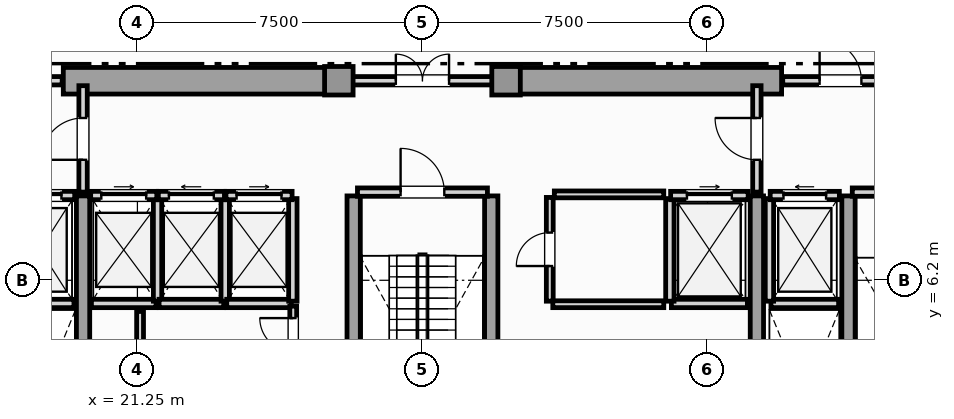
"""IFC4 building model, lengths in metres.
Left out: names, types, materials, properties, quantities, classifications, styles, units other than length and angle.
Written with IfcOpenShell. Run it as: python <this file> out.ifc"""

import sys

from ifc_helpers import new_model, si_unit, direction, frame, frame_2d, origin, origin_2d, place, context, subcontext, project, spatial, rectangle, extrude, element, fill, save


model = new_model("IFC4")
c1 = context("Model", 3, precision=1e-05, world=origin(), true_north=direction((0.0, 1.0)))
c2 = subcontext(c1, "Body", "Model", "MODEL_VIEW")
j1 = project(units=[si_unit("LENGTHUNIT", "METRE"), si_unit("PLANEANGLEUNIT", "RADIAN")], contexts=[c1])
p1 = place(None, origin())
s1 = spatial("IfcSite", under=j1, at=p1, CompositionType="ELEMENT")
p2 = place(p1, origin())
s2 = spatial("IfcBuilding", under=s1, at=p2, CompositionType="ELEMENT")
p3 = place(p2, frame((0.0, 0.0, 140.15)))
s3 = spatial("IfcBuildingStorey", under=s2, at=p3, CompositionType="ELEMENT", Elevation=140.15)
for number, where, z_axis, x_axis in (
    (1, (19.3, 11.45, 0.0), (0.0, 0.0, 1.0), (1.0, 0.0, 0.0)),
    (2, (30.9, 11.45, 0.0), (0.0, 0.0, 1.0), (1.0, 0.0, 0.0)),
):
    element("IfcWall", number, at=place(p3, frame(where, z_axis=z_axis, x_axis=x_axis)), inside=s3, PredefinedType="SHEAR", context=c2, shape_type="SweptSolid", body=[
        extrude(rectangle(XDim=7.3, YDim=0.7, at=frame_2d((3.65, 0.0))), origin(), (0.0, 0.0, 1.0), 4.83),
    ])
for number, where, z_axis, x_axis in (
    (3, (19.82, 0.92, 0.0), (0.0, 0.0, 1.0), (0.0, 1.0, 0.0)),
    (4, (26.94, 0.92, 0.0), (0.0, 0.0, 1.0), (0.0, 1.0, 0.0)),
    (5, (30.56, 0.92, 0.0), (0.0, 0.0, 1.0), (0.0, 1.0, 0.0)),
    (6, (37.55, 0.92, 0.0), (0.0, 0.0, 1.0), (0.0, 1.0, 0.0)),
    (7, (39.96, 0.92, 0.0), (0.0, 0.0, 1.0), (0.0, 1.0, 0.0)),
):
    element("IfcWall", number, at=place(p3, frame(where, z_axis=z_axis, x_axis=x_axis)), inside=s3, PredefinedType="SHEAR", context=c2, shape_type="SweptSolid", body=[
        extrude(rectangle(XDim=7.5, YDim=0.35, at=frame_2d((3.75, 0.0))), origin(), (0.0, 0.0, 1.0), 4.83),
    ])
for number, where, z_axis, x_axis in (
    (8, (26.55, 11.45, 0.0), (0.0, 0.0, 1.0), (1.0, 0.0, 0.0)),
    (9, (30.95, 11.45, 0.0), (0.0, 0.0, 1.0), (1.0, 0.0, 0.0)),
):
    element("IfcColumn", number, at=place(p3, frame(where, z_axis=z_axis, x_axis=x_axis)), inside=s3, PredefinedType="COLUMN", context=c2, shape_type="SweptSolid", body=[
        extrude(rectangle(XDim=0.75, YDim=0.75, at=origin_2d()), origin(), (0.0, 0.0, 1.0), 5.05),
    ])
p4 = place(p3, frame((17.8, 5.59, 0.0), z_axis=(0.0, 0.0, 1.0), x_axis=(1.0, 0.0, 0.0)))
e10 = element("IfcWall", 10, at=p4, inside=s3, PredefinedType="SOLIDWALL", context=c2, shape_type="SweptSolid", body=[
    extrude(rectangle(XDim=1.78, YDim=0.22, at=frame_2d((0.89, 0.0))), origin(), (0.0, 0.0, 1.0), 4.83),
])
p5 = place(p3, frame((17.78, 8.43, 0.0), z_axis=(0.0, 0.0, 1.0), x_axis=(1.0, 0.0, 0.0)))
e11 = element("IfcWall", 11, at=p5, inside=s3, PredefinedType="SOLIDWALL", context=c2, shape_type="SweptSolid", body=[
    extrude(rectangle(XDim=1.82, YDim=0.22, at=frame_2d((0.91, 0.0))), origin(), (0.0, 0.0, 1.0), 4.83),
])
p6 = place(p5, frame((0.35, 0.0, 0.0)))
e12 = element("IfcOpeningElement", 12, at=p6, cuts=e11, PredefinedType="OPENING", context=c2, shape_type="SweptSolid", body=[
    extrude(rectangle(XDim=1.12, YDim=2.25, at=frame_2d((0.56, 1.125))), frame((0.0, 0.12, 0.0), z_axis=(0.0, -1.0, 0.0), x_axis=(1.0, 0.0, 0.0)), (0.0, 0.0, 1.0), 0.24),
])
p7 = place(p3, frame((37.92, 5.59, 0.0), z_axis=(0.0, 0.0, 1.0), x_axis=(1.0, 0.0, 0.0)))
e13 = element("IfcWall", 13, at=p7, inside=s3, PredefinedType="SOLIDWALL", context=c2, shape_type="SweptSolid", body=[
    extrude(rectangle(XDim=1.78, YDim=0.22, at=frame_2d((0.89, 0.0))), origin(), (0.0, 0.0, 1.0), 4.83),
])
p8 = place(p3, frame((37.88, 5.65, 0.0), z_axis=(0.0, 0.0, 1.0), x_axis=(0.0, 1.0, 0.0)))
e14 = element("IfcWall", 14, at=p8, inside=s3, PredefinedType="SOLIDWALL", context=c2, shape_type="SweptSolid", body=[
    extrude(rectangle(XDim=2.7, YDim=0.22, at=frame_2d((1.35, 0.0))), origin(), (0.0, 0.0, 1.0), 4.83),
])
p9 = place(p3, frame((37.9, 8.43, 0.0), z_axis=(0.0, 0.0, 1.0), x_axis=(1.0, 0.0, 0.0)))
e15 = element("IfcWall", 15, at=p9, inside=s3, PredefinedType="SOLIDWALL", context=c2, shape_type="SweptSolid", body=[
    extrude(rectangle(XDim=1.82, YDim=0.22, at=frame_2d((0.91, 0.0))), origin(), (0.0, 0.0, 1.0), 4.83),
])
p10 = place(p9, frame((0.35, 0.0, 0.0)))
e16 = element("IfcOpeningElement", 16, at=p10, cuts=e15, PredefinedType="OPENING", context=c2, shape_type="SweptSolid", body=[
    extrude(rectangle(XDim=1.12, YDim=2.25, at=frame_2d((0.56, 1.125))), frame((0.0, 0.12, 0.0), z_axis=(0.0, -1.0, 0.0), x_axis=(1.0, 0.0, 0.0)), (0.0, 0.0, 1.0), 0.24),
])
p11 = place(p3, frame((35.3, 5.59, 0.0), z_axis=(0.0, 0.0, 1.0), x_axis=(1.0, 0.0, 0.0)))
e17 = element("IfcWall", 17, at=p11, inside=s3, PredefinedType="SOLIDWALL", context=c2, shape_type="SweptSolid", body=[
    extrude(rectangle(XDim=2.0, YDim=0.22, at=frame_2d((1.0, 0.0))), origin(), (0.0, 0.0, 1.0), 4.83),
])
p12 = place(p3, frame((35.26, 5.65, 0.0), z_axis=(0.0, 0.0, 1.0), x_axis=(0.0, 1.0, 0.0)))
e18 = element("IfcWall", 18, at=p12, inside=s3, PredefinedType="SOLIDWALL", context=c2, shape_type="SweptSolid", body=[
    extrude(rectangle(XDim=2.7, YDim=0.22, at=frame_2d((1.35, 0.0))), origin(), (0.0, 0.0, 1.0), 4.83),
])
p13 = place(p3, frame((35.28, 8.43, 0.0), z_axis=(0.0, 0.0, 1.0), x_axis=(1.0, 0.0, 0.0)))
e19 = element("IfcWall", 19, at=p13, inside=s3, PredefinedType="SOLIDWALL", context=c2, shape_type="SweptSolid", body=[
    extrude(rectangle(XDim=2.04, YDim=0.22, at=frame_2d((1.02, 0.0))), origin(), (0.0, 0.0, 1.0), 4.83),
])
p14 = place(p13, frame((0.43, 0.0, 0.0)))
e20 = element("IfcOpeningElement", 20, at=p14, cuts=e19, PredefinedType="OPENING", context=c2, shape_type="SweptSolid", body=[
    extrude(rectangle(XDim=1.18, YDim=2.2, at=frame_2d((0.59, 1.1))), frame((0.0, 0.12, 0.0), z_axis=(0.0, -1.0, 0.0), x_axis=(1.0, 0.0, 0.0)), (0.0, 0.0, 1.0), 0.24),
])
p15 = place(p3, frame((20.04, 5.59, 0.0), z_axis=(0.0, 0.0, 1.0), x_axis=(1.0, 0.0, 0.0)))
e21 = element("IfcWall", 21, at=p15, inside=s3, PredefinedType="SOLIDWALL", context=c2, shape_type="SweptSolid", body=[
    extrude(rectangle(XDim=1.7, YDim=0.22, at=frame_2d((0.85, 0.0))), origin(), (0.0, 0.0, 1.0), 4.83),
])
p16 = place(p3, frame((21.78, 5.65, 0.0), z_axis=(0.0, 0.0, 1.0), x_axis=(0.0, 1.0, 0.0)))
e22 = element("IfcWall", 22, at=p16, inside=s3, PredefinedType="SOLIDWALL", context=c2, shape_type="SweptSolid", body=[
    extrude(rectangle(XDim=2.7, YDim=0.22, at=frame_2d((1.35, 0.0))), origin(), (0.0, 0.0, 1.0), 4.83),
])
p17 = place(p3, frame((20.02, 8.43, 0.0), z_axis=(0.0, 0.0, 1.0), x_axis=(1.0, 0.0, 0.0)))
e23 = element("IfcWall", 23, at=p17, inside=s3, PredefinedType="SOLIDWALL", context=c2, shape_type="SweptSolid", body=[
    extrude(rectangle(XDim=1.74, YDim=0.22, at=frame_2d((0.87, 0.0))), origin(), (0.0, 0.0, 1.0), 4.83),
])
p18 = place(p17, frame((0.28, 0.0, 0.0)))
e24 = element("IfcOpeningElement", 24, at=p18, cuts=e23, PredefinedType="OPENING", context=c2, shape_type="SweptSolid", body=[
    extrude(rectangle(XDim=1.18, YDim=2.2, at=frame_2d((0.59, 1.1))), frame((0.0, 0.12, 0.0), z_axis=(0.0, -1.0, 0.0), x_axis=(1.0, 0.0, 0.0)), (0.0, 0.0, 1.0), 0.24),
])
p19 = place(p3, frame((21.82, 5.59, 0.0), z_axis=(0.0, 0.0, 1.0), x_axis=(1.0, 0.0, 0.0)))
e25 = element("IfcWall", 25, at=p19, inside=s3, PredefinedType="SOLIDWALL", context=c2, shape_type="SweptSolid", body=[
    extrude(rectangle(XDim=1.7, YDim=0.22, at=frame_2d((0.85, 0.0))), origin(), (0.0, 0.0, 1.0), 4.83),
])
p20 = place(p3, frame((23.56, 5.65, 0.0), z_axis=(0.0, 0.0, 1.0), x_axis=(0.0, 1.0, 0.0)))
e26 = element("IfcWall", 26, at=p20, inside=s3, PredefinedType="SOLIDWALL", context=c2, shape_type="SweptSolid", body=[
    extrude(rectangle(XDim=2.7, YDim=0.22, at=frame_2d((1.35, 0.0))), origin(), (0.0, 0.0, 1.0), 4.83),
])
p21 = place(p3, frame((21.8, 8.43, 0.0), z_axis=(0.0, 0.0, 1.0), x_axis=(1.0, 0.0, 0.0)))
e27 = element("IfcWall", 27, at=p21, inside=s3, PredefinedType="SOLIDWALL", context=c2, shape_type="SweptSolid", body=[
    extrude(rectangle(XDim=1.74, YDim=0.22, at=frame_2d((0.87, 0.0))), origin(), (0.0, 0.0, 1.0), 4.83),
])
p22 = place(p21, frame((0.28, 0.0, 0.0)))
e28 = element("IfcOpeningElement", 28, at=p22, cuts=e27, PredefinedType="OPENING", context=c2, shape_type="SweptSolid", body=[
    extrude(rectangle(XDim=1.18, YDim=2.2, at=frame_2d((0.59, 1.1))), frame((0.0, 0.12, 0.0), z_axis=(0.0, -1.0, 0.0), x_axis=(1.0, 0.0, 0.0)), (0.0, 0.0, 1.0), 0.24),
])
p23 = place(p3, frame((23.6, 5.59, 0.0), z_axis=(0.0, 0.0, 1.0), x_axis=(1.0, 0.0, 0.0)))
e29 = element("IfcWall", 29, at=p23, inside=s3, PredefinedType="SOLIDWALL", context=c2, shape_type="SweptSolid", body=[
    extrude(rectangle(XDim=1.7, YDim=0.22, at=frame_2d((0.85, 0.0))), origin(), (0.0, 0.0, 1.0), 4.83),
])
p24 = place(p3, frame((25.34, 5.65, 0.0), z_axis=(0.0, 0.0, 1.0), x_axis=(0.0, 1.0, 0.0)))
e30 = element("IfcWall", 30, at=p24, inside=s3, PredefinedType="SOLIDWALL", context=c2, shape_type="SweptSolid", body=[
    extrude(rectangle(XDim=2.7, YDim=0.22, at=frame_2d((1.35, 0.0))), origin(), (0.0, 0.0, 1.0), 4.83),
])
p25 = place(p3, frame((23.58, 8.43, 0.0), z_axis=(0.0, 0.0, 1.0), x_axis=(1.0, 0.0, 0.0)))
e31 = element("IfcWall", 31, at=p25, inside=s3, PredefinedType="SOLIDWALL", context=c2, shape_type="SweptSolid", body=[
    extrude(rectangle(XDim=1.74, YDim=0.22, at=frame_2d((0.87, 0.0))), origin(), (0.0, 0.0, 1.0), 4.83),
])
p26 = place(p25, frame((0.28, 0.0, 0.0)))
e32 = element("IfcOpeningElement", 32, at=p26, cuts=e31, PredefinedType="OPENING", context=c2, shape_type="SweptSolid", body=[
    extrude(rectangle(XDim=1.18, YDim=2.2, at=frame_2d((0.59, 1.1))), frame((0.0, 0.12, 0.0), z_axis=(0.0, -1.0, 0.0), x_axis=(1.0, 0.0, 0.0)), (0.0, 0.0, 1.0), 0.24),
])
p27 = place(p3, frame((40.06, 8.52, 0.0), z_axis=(0.0, 0.0, 1.0), x_axis=(1.0, 0.0, 0.0)))
e33 = element("IfcWall", 33, at=p27, inside=s3, PredefinedType="SOLIDWALL", context=c2, shape_type="SweptSolid", body=[
    extrude(rectangle(XDim=3.4, YDim=0.22, at=frame_2d((1.7, 0.0))), origin(), (0.0, 0.0, 1.0), 4.83),
])
p28 = place(p27, frame((1.125, 0.0, 0.0)))
e34 = element("IfcOpeningElement", 34, at=p28, cuts=e33, PredefinedType="OPENING", context=c2, shape_type="SweptSolid", body=[
    extrude(rectangle(XDim=1.15, YDim=2.2, at=frame_2d((0.575, 1.1))), frame((0.0, 0.12, 0.0), z_axis=(0.0, -1.0, 0.0), x_axis=(1.0, 0.0, 0.0)), (0.0, 0.0, 1.0), 0.24),
])
p29 = place(p3, frame((27.04, 8.52, 0.0), z_axis=(0.0, 0.0, 1.0), x_axis=(1.0, 0.0, 0.0)))
e35 = element("IfcWall", 35, at=p29, inside=s3, PredefinedType="SOLIDWALL", context=c2, shape_type="SweptSolid", body=[
    extrude(rectangle(XDim=3.42, YDim=0.22, at=frame_2d((1.71, 0.0))), origin(), (0.0, 0.0, 1.0), 4.83),
])
p30 = place(p29, frame((1.135, 0.0, 0.0)))
e36 = element("IfcOpeningElement", 36, at=p30, cuts=e35, PredefinedType="OPENING", context=c2, shape_type="SweptSolid", body=[
    extrude(rectangle(XDim=1.15, YDim=2.2, at=frame_2d((0.575, 1.1))), frame((0.0, 0.12, 0.0), z_axis=(0.0, -1.0, 0.0), x_axis=(1.0, 0.0, 0.0)), (0.0, 0.0, 1.0), 0.24),
])
p31 = place(p3, frame((19.82, 8.52, 0.0), z_axis=(0.0, 0.0, 1.0), x_axis=(0.0, 1.0, 0.0)))
e37 = element("IfcWall", 37, at=p31, inside=s3, PredefinedType="SOLIDWALL", context=c2, shape_type="SweptSolid", body=[
    extrude(rectangle(XDim=2.8, YDim=0.22, at=frame_2d((1.4, 0.0))), origin(), (0.0, 0.0, 1.0), 4.286),
])
p32 = place(p31, frame((0.85, 0.0, 0.0)))
e38 = element("IfcOpeningElement", 38, at=p32, cuts=e37, PredefinedType="OPENING", context=c2, shape_type="SweptSolid", body=[
    extrude(rectangle(XDim=1.1, YDim=2.2, at=frame_2d((0.55, 1.1))), frame((0.0, 0.12, 0.0), z_axis=(0.0, -1.0, 0.0), x_axis=(1.0, 0.0, 0.0)), (0.0, 0.0, 1.0), 0.24),
])
p33 = place(p3, frame((37.55, 8.52, 0.0), z_axis=(0.0, 0.0, 1.0), x_axis=(0.0, 1.0, 0.0)))
e39 = element("IfcWall", 39, at=p33, inside=s3, PredefinedType="SOLIDWALL", context=c2, shape_type="SweptSolid", body=[
    extrude(rectangle(XDim=2.8, YDim=0.22, at=frame_2d((1.4, 0.0))), origin(), (0.0, 0.0, 1.0), 4.286),
])
p34 = place(p33, frame((0.85, 0.0, 0.0)))
e40 = element("IfcOpeningElement", 40, at=p34, cuts=e39, PredefinedType="OPENING", context=c2, shape_type="SweptSolid", body=[
    extrude(rectangle(XDim=1.1, YDim=2.2, at=frame_2d((0.55, 1.1))), frame((0.0, 0.12, 0.0), z_axis=(0.0, -1.0, 0.0), x_axis=(1.0, 0.0, 0.0)), (0.0, 0.0, 1.0), 0.24),
])
p35 = place(p3, frame((16.23, 11.45, 0.0), z_axis=(0.0, 0.0, 1.0), x_axis=(1.0, 0.0, 0.0)))
e41 = element("IfcWall", 41, at=p35, inside=s3, PredefinedType="SOLIDWALL", context=c2, shape_type="SweptSolid", body=[
    extrude(rectangle(XDim=3.04, YDim=0.22, at=frame_2d((1.52, 0.0))), origin(), (0.0, 0.0, 1.0), 4.83),
])
p36 = place(p35, frame((0.97, 0.0, 0.0)))
e42 = element("IfcOpeningElement", 42, at=p36, cuts=e41, PredefinedType="OPENING", context=c2, shape_type="SweptSolid", body=[
    extrude(rectangle(XDim=1.1, YDim=2.2, at=frame_2d((0.55, 1.1))), frame((0.0, 0.12, 0.0), z_axis=(0.0, -1.0, 0.0), x_axis=(1.0, 0.0, 0.0)), (0.0, 0.0, 1.0), 0.24),
])
p37 = place(p3, frame((26.63, 11.45, 0.0), z_axis=(0.0, 0.0, 1.0), x_axis=(1.0, 0.0, 0.0)))
e43 = element("IfcWall", 43, at=p37, inside=s3, PredefinedType="SOLIDWALL", context=c2, shape_type="SweptSolid", body=[
    extrude(rectangle(XDim=4.24, YDim=0.22, at=frame_2d((2.12, 0.0))), origin(), (0.0, 0.0, 1.0), 4.83),
])
p38 = place(p37, frame((1.42, 0.0, 0.0)))
e44 = element("IfcOpeningElement", 44, at=p38, cuts=e43, PredefinedType="OPENING", context=c2, shape_type="SweptSolid", body=[
    extrude(rectangle(XDim=1.4, YDim=2.2, at=frame_2d((0.7, 1.1))), frame((0.0, 0.12, 0.0), z_axis=(0.0, -1.0, 0.0), x_axis=(1.0, 0.0, 0.0)), (0.0, 0.0, 1.0), 0.24),
])
p39 = place(p3, frame((38.23, 11.45, 0.0), z_axis=(0.0, 0.0, 1.0), x_axis=(1.0, 0.0, 0.0)))
e45 = element("IfcWall", 45, at=p39, inside=s3, PredefinedType="SOLIDWALL", context=c2, shape_type="SweptSolid", body=[
    extrude(rectangle(XDim=3.04, YDim=0.22, at=frame_2d((1.52, 0.0))), origin(), (0.0, 0.0, 1.0), 4.83),
])
p40 = place(p39, frame((0.97, 0.0, 0.0)))
e46 = element("IfcOpeningElement", 46, at=p40, cuts=e45, PredefinedType="OPENING", context=c2, shape_type="SweptSolid", body=[
    extrude(rectangle(XDim=1.1, YDim=2.2, at=frame_2d((0.55, 1.1))), frame((0.0, 0.12, 0.0), z_axis=(0.0, -1.0, 0.0), x_axis=(1.0, 0.0, 0.0)), (0.0, 0.0, 1.0), 0.24),
])
p41 = place(p3, frame((25.35, 4.01, 0.0), z_axis=(0.0, 0.0, 1.0), x_axis=(0.0, 1.0, 0.0)))
e47 = element("IfcWall", 47, at=p41, inside=s3, PredefinedType="PARTITIONING", context=c2, shape_type="SweptSolid", body=[
    extrude(rectangle(XDim=1.51, YDim=0.18, at=frame_2d((0.755, 0.0))), origin(), (0.0, 0.0, 1.0), 4.83),
])
p42 = place(p41, frame((0.315, 0.0, 0.0)))
e48 = element("IfcOpeningElement", 48, at=p42, cuts=e47, PredefinedType="OPENING", context=c2, shape_type="SweptSolid", body=[
    extrude(rectangle(XDim=0.88, YDim=2.05, at=frame_2d((0.44, 1.025))), frame((0.0, 0.1, 0.0), z_axis=(0.0, -1.0, 0.0), x_axis=(1.0, 0.0, 0.0)), (0.0, 0.0, 1.0), 0.2),
])
p43 = place(p3, frame((21.32, 3.96, 0.0), z_axis=(0.0, 0.0, 1.0), x_axis=(0.0, 1.0, 0.0)))
e49 = element("IfcWall", 49, at=p43, inside=s3, PredefinedType="PARTITIONING", context=c2, shape_type="SweptSolid", body=[
    extrude(rectangle(XDim=1.42, YDim=0.18, at=frame_2d((0.71, 0.0))), origin(), (0.0, 0.0, 1.0), 4.83),
])
p44 = place(p3, frame((32.1, 5.65, 0.0), z_axis=(0.0, 0.0, 1.0), x_axis=(0.0, 1.0, 0.0)))
e50 = element("IfcWall", 50, at=p44, inside=s3, PredefinedType="PARTITIONING", context=c2, shape_type="SweptSolid", body=[
    extrude(rectangle(XDim=2.73, YDim=0.18, at=frame_2d((1.365, 0.0))), origin(), (0.0, 0.0, 1.0), 4.83),
])
p45 = place(p44, frame((0.925, 0.0, 0.0)))
e51 = element("IfcOpeningElement", 51, at=p45, cuts=e50, PredefinedType="OPENING", context=c2, shape_type="SweptSolid", body=[
    extrude(rectangle(XDim=0.88, YDim=2.05, at=frame_2d((0.44, 1.025))), frame((0.0, 0.1, 0.0), z_axis=(0.0, -1.0, 0.0), x_axis=(1.0, 0.0, 0.0)), (0.0, 0.0, 1.0), 0.2),
])
p46 = place(p3, frame((32.22, 8.46, 0.0), z_axis=(0.0, 0.0, 1.0), x_axis=(1.0, 0.0, 0.0)))
e52 = element("IfcWall", 52, at=p46, inside=s3, PredefinedType="PARTITIONING", context=c2, shape_type="SweptSolid", body=[
    extrude(rectangle(XDim=2.88, YDim=0.18, at=frame_2d((1.44, 0.0))), origin(), (0.0, 0.0, 1.0), 4.83),
])
p47 = place(p3, frame((32.18, 5.57, 0.0), z_axis=(0.0, 0.0, 1.0), x_axis=(1.0, 0.0, 0.0)))
e53 = element("IfcWall", 53, at=p47, inside=s3, PredefinedType="PARTITIONING", context=c2, shape_type="SweptSolid", body=[
    extrude(rectangle(XDim=2.92, YDim=0.18, at=frame_2d((1.46, 0.0))), origin(), (0.0, 0.0, 1.0), 4.83),
])
p48 = place(p6, origin())
e54 = element("IfcDoor", 54, at=p48, inside=s3, OperationType="SLIDING_TO_RIGHT", PredefinedType="DOOR", context=c2, shape_type="SweptSolid", body=[
    extrude(rectangle(XDim=1.12, YDim=2.25, at=frame_2d((0.56, 1.125))), frame((0.0, 0.025, 0.0), z_axis=(0.0, -1.0, 0.0), x_axis=(1.0, 0.0, 0.0)), (0.0, 0.0, 1.0), 0.05),
])
fill(e12, e54)
p49 = place(p10, origin())
e55 = element("IfcDoor", 55, at=p49, inside=s3, OperationType="SLIDING_TO_LEFT", PredefinedType="DOOR", context=c2, shape_type="SweptSolid", body=[
    extrude(rectangle(XDim=1.12, YDim=2.25, at=frame_2d((0.56, 1.125))), frame((0.0, 0.025, 0.0), z_axis=(0.0, -1.0, 0.0), x_axis=(1.0, 0.0, 0.0)), (0.0, 0.0, 1.0), 0.05),
])
fill(e16, e55)
p50 = place(p14, origin())
e56 = element("IfcDoor", 56, at=p50, inside=s3, OperationType="SLIDING_TO_RIGHT", PredefinedType="DOOR", context=c2, shape_type="SweptSolid", body=[
    extrude(rectangle(XDim=1.18, YDim=2.2, at=frame_2d((0.59, 1.1))), frame((0.0, 0.025, 0.0), z_axis=(0.0, -1.0, 0.0), x_axis=(1.0, 0.0, 0.0)), (0.0, 0.0, 1.0), 0.05),
])
fill(e20, e56)
p51 = place(p18, origin())
e57 = element("IfcDoor", 57, at=p51, inside=s3, OperationType="SLIDING_TO_RIGHT", PredefinedType="DOOR", context=c2, shape_type="SweptSolid", body=[
    extrude(rectangle(XDim=1.18, YDim=2.2, at=frame_2d((0.59, 1.1))), frame((0.0, 0.025, 0.0), z_axis=(0.0, -1.0, 0.0), x_axis=(1.0, 0.0, 0.0)), (0.0, 0.0, 1.0), 0.05),
])
fill(e24, e57)
p52 = place(p22, origin())
e58 = element("IfcDoor", 58, at=p52, inside=s3, OperationType="SLIDING_TO_LEFT", PredefinedType="DOOR", context=c2, shape_type="SweptSolid", body=[
    extrude(rectangle(XDim=1.18, YDim=2.2, at=frame_2d((0.59, 1.1))), frame((0.0, 0.025, 0.0), z_axis=(0.0, -1.0, 0.0), x_axis=(1.0, 0.0, 0.0)), (0.0, 0.0, 1.0), 0.05),
])
fill(e28, e58)
p53 = place(p26, origin())
e59 = element("IfcDoor", 59, at=p53, inside=s3, OperationType="SLIDING_TO_RIGHT", PredefinedType="DOOR", context=c2, shape_type="SweptSolid", body=[
    extrude(rectangle(XDim=1.18, YDim=2.2, at=frame_2d((0.59, 1.1))), frame((0.0, 0.025, 0.0), z_axis=(0.0, -1.0, 0.0), x_axis=(1.0, 0.0, 0.0)), (0.0, 0.0, 1.0), 0.05),
])
fill(e32, e59)
p54 = place(p30, origin())
e60 = element("IfcDoor", 60, at=p54, inside=s3, OperationType="SINGLE_SWING_LEFT", PredefinedType="DOOR", context=c2, shape_type="SweptSolid", body=[
    extrude(rectangle(XDim=1.15, YDim=2.2, at=frame_2d((0.575, 1.1))), frame((0.0, 0.025, 0.0), z_axis=(0.0, -1.0, 0.0), x_axis=(1.0, 0.0, 0.0)), (0.0, 0.0, 1.0), 0.05),
])
fill(e36, e60)
p55 = place(p32, origin())
e61 = element("IfcDoor", 61, at=p55, inside=s3, OperationType="SINGLE_SWING_LEFT", PredefinedType="DOOR", context=c2, shape_type="SweptSolid", body=[
    extrude(rectangle(XDim=1.1, YDim=2.2, at=frame_2d((0.55, 1.1))), frame((0.0, 0.025, 0.0), z_axis=(0.0, -1.0, 0.0), x_axis=(1.0, 0.0, 0.0)), (0.0, 0.0, 1.0), 0.05),
])
fill(e38, e61)
p56 = place(p34, origin())
e62 = element("IfcDoor", 62, at=p56, inside=s3, OperationType="SINGLE_SWING_RIGHT", PredefinedType="DOOR", context=c2, shape_type="SweptSolid", body=[
    extrude(rectangle(XDim=1.1, YDim=2.2, at=frame_2d((0.55, 1.1))), frame((0.0, 0.025, 0.0), z_axis=(0.0, -1.0, 0.0), x_axis=(1.0, 0.0, 0.0)), (0.0, 0.0, 1.0), 0.05),
])
fill(e40, e62)
p57 = place(p38, origin())
e63 = element("IfcDoor", 63, at=p57, inside=s3, OperationType="DOUBLE_DOOR_SINGLE_SWING", PredefinedType="DOOR", context=c2, shape_type="SweptSolid", body=[
    extrude(rectangle(XDim=1.4, YDim=2.2, at=frame_2d((0.7, 1.1))), frame((0.0, 0.025, 0.0), z_axis=(0.0, -1.0, 0.0), x_axis=(1.0, 0.0, 0.0)), (0.0, 0.0, 1.0), 0.05),
])
fill(e44, e63)
p58 = place(p40, origin())
e64 = element("IfcDoor", 64, at=p58, inside=s3, OperationType="SINGLE_SWING_LEFT", PredefinedType="DOOR", context=c2, shape_type="SweptSolid", body=[
    extrude(rectangle(XDim=1.1, YDim=2.2, at=frame_2d((0.55, 1.1))), frame((0.0, 0.025, 0.0), z_axis=(0.0, -1.0, 0.0), x_axis=(1.0, 0.0, 0.0)), (0.0, 0.0, 1.0), 0.05),
])
fill(e46, e64)
p59 = place(p42, origin())
e65 = element("IfcDoor", 65, at=p59, inside=s3, OperationType="SINGLE_SWING_RIGHT", PredefinedType="DOOR", context=c2, shape_type="SweptSolid", body=[
    extrude(rectangle(XDim=0.88, YDim=2.05, at=frame_2d((0.44, 1.025))), frame((0.0, 0.025, 0.0), z_axis=(0.0, -1.0, 0.0), x_axis=(1.0, 0.0, 0.0)), (0.0, 0.0, 1.0), 0.05),
])
fill(e48, e65)
p60 = place(p45, origin())
e66 = element("IfcDoor", 66, at=p60, inside=s3, OperationType="SINGLE_SWING_LEFT", PredefinedType="DOOR", context=c2, shape_type="SweptSolid", body=[
    extrude(rectangle(XDim=0.88, YDim=2.05, at=frame_2d((0.44, 1.025))), frame((0.0, 0.025, 0.0), z_axis=(0.0, -1.0, 0.0), x_axis=(1.0, 0.0, 0.0)), (0.0, 0.0, 1.0), 0.05),
])
fill(e51, e66)
save(model, sys.argv[1])
